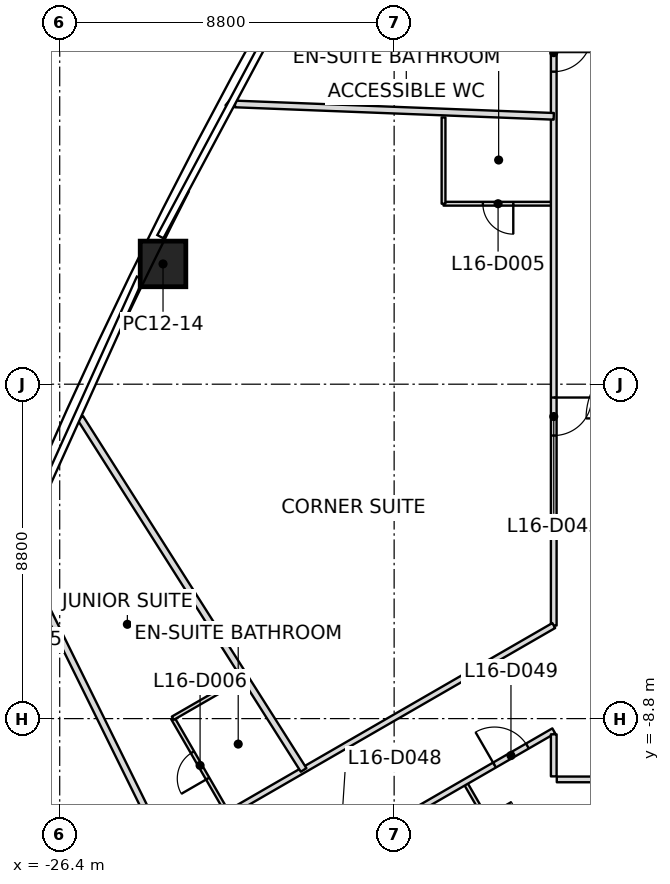
"""IFC4 building model, lengths in metres.
Left out: names, types, materials, properties, quantities, classifications, styles, units other than length and angle.
Written with IfcOpenShell. Run it as: python <this file> out.ifc"""

import sys

from ifc_helpers import new_model, si_unit, direction, frame, frame_2d, origin, origin_2d, place, context, subcontext, project, spatial, rectangle, extrude, element, fill, save


model = new_model("IFC4")
c1 = context("Model", 3, precision=1e-05, world=origin(), true_north=direction((0.0, 1.0)))
c2 = subcontext(c1, "Body", "Model", "MODEL_VIEW")
j1 = project(units=[si_unit("LENGTHUNIT", "METRE"), si_unit("PLANEANGLEUNIT", "RADIAN")], contexts=[c1])
p1 = place(None, origin())
s1 = spatial("IfcSite", under=j1, at=p1, CompositionType="ELEMENT")
p2 = place(p1, origin())
s2 = spatial("IfcBuilding", under=s1, at=p2, CompositionType="ELEMENT")
p3 = place(p2, frame((0.0, 0.0, 81.3)))
s3 = spatial("IfcBuildingStorey", under=s2, at=p3, CompositionType="ELEMENT", Elevation=81.3)
p4 = place(p3, frame((-23.681, 3.165, 0.0), z_axis=(0.015306644787, 0.002309192102, 0.99988017995), x_axis=(0.441466655393, 0.897234204469, -0.008830317467)))
e1 = element("IfcColumn", 1, at=p4, inside=s3, PredefinedType="COLUMN", context=c2, shape_type="SweptSolid", body=[
    extrude(rectangle(XDim=1.2, YDim=1.2, at=origin_2d()), origin(), (0.0, 0.0, 1.0), 3.7),
])
p5 = place(p3, frame((-27.428, -5.133, 0.0), z_axis=(0.019460669214, 0.010950749456, 0.999750650632), x_axis=(0.381024023637, 0.924398704075, -0.017542215233)))
e2 = element("IfcColumn", 2, at=p5, inside=s3, PredefinedType="COLUMN", context=c2, shape_type="SweptSolid", body=[
    extrude(rectangle(XDim=1.2, YDim=1.2, at=origin_2d()), origin(), (0.0, 0.0, 1.0), 3.701),
])
p6 = place(p3, frame((-23.619, -12.251, 0.0), z_axis=(0.0, 0.0, 1.0), x_axis=(-0.442324638578, 0.896855012868, 0.0)))
e3 = element("IfcWall", 3, at=p6, inside=s3, PredefinedType="PARTITIONING", context=c2, shape_type="SweptSolid", body=[
    extrude(rectangle(XDim=8.701, YDim=0.175, at=frame_2d((4.351, 0.0))), origin(), (0.0, 0.0, 1.0), 3.15),
])
p7 = place(p3, frame((-19.982, -10.151, 0.0), z_axis=(0.0, 0.0, 1.0), x_axis=(-0.535687161916, 0.844416523144, 0.0)))
e4 = element("IfcWall", 4, at=p7, inside=s3, PredefinedType="PARTITIONING", context=c2, shape_type="SweptSolid", body=[
    extrude(rectangle(XDim=10.972, YDim=0.175, at=frame_2d((5.486, 0.0))), origin(), (0.0, 0.0, 1.0), 2.934),
])
p8 = place(p3, frame((-21.837, 7.288, 0.0), z_axis=(0.0, 0.0, 1.0), x_axis=(-0.77226902916, 0.635295637164, 0.0)))
e5 = element("IfcWall", 5, at=p8, inside=s3, PredefinedType="PARTITIONING", context=c2, shape_type="SweptSolid", body=[
    extrude(rectangle(XDim=0.187, YDim=0.175, at=frame_2d((0.094, 0.0))), origin(), (0.0, 0.0, 1.0), 3.15),
])
p9 = place(p3, frame((-21.787, 7.375, 0.0), z_axis=(0.0, 0.0, 1.0), x_axis=(0.999247968332, -0.038774963373, 0.0)))
e6 = element("IfcWall", 6, at=p9, inside=s3, PredefinedType="PARTITIONING", context=c2, shape_type="SweptSolid", body=[
    extrude(rectangle(XDim=8.393, YDim=0.175, at=frame_2d((4.197, 0.0))), origin(), (0.0, 0.0, 1.0), 2.934),
])
p10 = place(p3, frame((-13.4, 10.32, 0.0), z_axis=(0.0, 0.0, 1.0), x_axis=(0.0, -1.0, 0.0)))
e7 = element("IfcWall", 7, at=p10, inside=s3, PredefinedType="PARTITIONING", context=c2, shape_type="SweptSolid", body=[
    extrude(rectangle(XDim=16.671, YDim=0.15, at=frame_2d((8.335, 0.0))), origin(), (0.0, 0.0, 1.0), 2.947),
])
p11 = place(p10, frame((1.095, 0.0, 0.0)))
e8 = element("IfcOpeningElement", 8, at=p11, cuts=e7, PredefinedType="OPENING", context=c2, shape_type="SweptSolid", body=[
    extrude(rectangle(XDim=1.0, YDim=2.1, at=frame_2d((0.5, 1.05))), frame((0.0, 0.075, 0.0), z_axis=(0.0, -1.0, 0.0), x_axis=(1.0, 0.0, 0.0)), (0.0, 0.0, 1.0), 0.15),
])
p12 = place(p10, frame((10.671, 0.0, 0.0)))
e9 = element("IfcOpeningElement", 9, at=p12, cuts=e7, PredefinedType="OPENING", context=c2, shape_type="SweptSolid", body=[
    extrude(rectangle(XDim=1.0, YDim=2.1, at=frame_2d((0.5, 1.05))), frame((0.0, 0.075, 0.0), z_axis=(0.0, -1.0, 0.0), x_axis=(1.0, 0.0, 0.0)), (0.0, 0.0, 1.0), 0.15),
])
p13 = place(p3, frame((-13.4, -6.351, 0.0), z_axis=(0.0, 0.0, 1.0), x_axis=(-0.866028447449, -0.499994728181, 0.0)))
e10 = element("IfcWall", 10, at=p13, inside=s3, PredefinedType="PARTITIONING", context=c2, shape_type="SweptSolid", body=[
    extrude(rectangle(XDim=11.72, YDim=0.15, at=frame_2d((5.86, 0.0))), origin(), (0.0, 0.0, 1.0), 2.947),
])
p14 = place(p13, frame((10.4, 0.0, 0.0)))
e11 = element("IfcOpeningElement", 11, at=p14, cuts=e10, PredefinedType="OPENING", context=c2, shape_type="SweptSolid", body=[
    extrude(rectangle(XDim=1.0, YDim=2.1, at=frame_2d((0.5, 1.05))), frame((0.0, 0.075, 0.0), z_axis=(0.0, -1.0, 0.0), x_axis=(1.0, 0.0, 0.0)), (0.0, 0.0, 1.0), 0.15),
])
p15 = place(p3, frame((-22.35, -14.29, 0.0), z_axis=(0.0, 0.0, 1.0), x_axis=(0.866021934756, 0.500006008485, 0.0)))
e12 = element("IfcWall", 12, at=p15, inside=s3, PredefinedType="PARTITIONING", context=c2, shape_type="SweptSolid", body=[
    extrude(rectangle(XDim=10.335, YDim=0.15, at=frame_2d((5.167, 0.0))), origin(), (0.0, 0.0, 1.0), 2.797),
])
p16 = place(p15, frame((3.327, 0.0, 0.0)))
e13 = element("IfcOpeningElement", 13, at=p16, cuts=e12, PredefinedType="OPENING", context=c2, shape_type="SweptSolid", body=[
    extrude(rectangle(XDim=1.0, YDim=2.1, at=frame_2d((0.5, 1.05))), frame((0.0, 0.075, 0.0), z_axis=(0.0, -1.0, 0.0), x_axis=(1.0, 0.0, 0.0)), (0.0, 0.0, 1.0), 0.15),
])
p17 = place(p15, frame((8.535, 0.0, 0.0)))
e14 = element("IfcOpeningElement", 14, at=p17, cuts=e12, PredefinedType="OPENING", context=c2, shape_type="SweptSolid", body=[
    extrude(rectangle(XDim=1.0, YDim=2.1, at=frame_2d((0.5, 1.05))), frame((0.0, 0.075, 0.0), z_axis=(0.0, -1.0, 0.0), x_axis=(1.0, 0.0, 0.0)), (0.0, 0.0, 1.0), 0.15),
])
p18 = place(p3, frame((-13.4, -9.214, 0.0), z_axis=(0.0, 0.0, 1.0), x_axis=(0.0, -1.0, 0.0)))
e15 = element("IfcWall", 15, at=p18, inside=s3, PredefinedType="PARTITIONING", context=c2, shape_type="SweptSolid", body=[
    extrude(rectangle(XDim=1.106, YDim=0.15, at=frame_2d((0.553, 0.0))), origin(), (0.0, 0.0, 1.0), 2.797),
])
p19 = place(p3, frame((-13.32, -10.4, 0.0), z_axis=(0.0, 0.0, 1.0), x_axis=(1.0, 0.0, 0.0)))
e16 = element("IfcWall", 16, at=p19, inside=s3, PredefinedType="PARTITIONING", context=c2, shape_type="SweptSolid", body=[
    extrude(rectangle(XDim=26.64, YDim=0.15, at=frame_2d((13.32, 0.0))), origin(), (0.0, 0.0, 1.0), 2.947),
])
p20 = place(p19, frame((7.72, 0.0, 0.0)))
e17 = element("IfcOpeningElement", 17, at=p20, cuts=e16, PredefinedType="OPENING", context=c2, shape_type="SweptSolid", body=[
    extrude(rectangle(XDim=1.0, YDim=2.1, at=frame_2d((0.5, 1.05))), frame((0.0, 0.075, 0.0), z_axis=(0.0, -1.0, 0.0), x_axis=(1.0, 0.0, 0.0)), (0.0, 0.0, 1.0), 0.15),
])
p21 = place(p19, frame((11.92, 0.0, 0.0)))
e18 = element("IfcOpeningElement", 18, at=p21, cuts=e16, PredefinedType="OPENING", context=c2, shape_type="SweptSolid", body=[
    extrude(rectangle(XDim=1.0, YDim=2.1, at=frame_2d((0.5, 1.05))), frame((0.0, 0.075, 0.0), z_axis=(0.0, -1.0, 0.0), x_axis=(1.0, 0.0, 0.0)), (0.0, 0.0, 1.0), 0.15),
])
p22 = place(p19, frame((16.52, 0.0, 0.0)))
e19 = element("IfcOpeningElement", 19, at=p22, cuts=e16, PredefinedType="OPENING", context=c2, shape_type="SweptSolid", body=[
    extrude(rectangle(XDim=1.0, YDim=2.1, at=frame_2d((0.5, 1.05))), frame((0.0, 0.075, 0.0), z_axis=(0.0, -1.0, 0.0), x_axis=(1.0, 0.0, 0.0)), (0.0, 0.0, 1.0), 0.15),
])
p23 = place(p19, frame((21.12, 0.0, 0.0)))
e20 = element("IfcOpeningElement", 20, at=p23, cuts=e16, PredefinedType="OPENING", context=c2, shape_type="SweptSolid", body=[
    extrude(rectangle(XDim=1.0, YDim=2.1, at=frame_2d((0.5, 1.05))), frame((0.0, 0.075, 0.0), z_axis=(0.0, -1.0, 0.0), x_axis=(1.0, 0.0, 0.0)), (0.0, 0.0, 1.0), 0.15),
])
p24 = place(p3, frame((-21.989, -11.275, 0.0), z_axis=(0.0, 0.0, 1.0), x_axis=(-0.499972835562, 0.866041086612, 0.0)))
e21 = element("IfcWall", 21, at=p24, inside=s3, PredefinedType="PARTITIONING", context=c2, shape_type="SweptSolid", body=[
    extrude(rectangle(XDim=2.87, YDim=0.1, at=frame_2d((1.435, 0.0))), origin(), (0.0, 0.0, 1.0), 3.15),
])
p25 = place(p24, frame((1.035, 0.0, 0.0)))
e22 = element("IfcOpeningElement", 22, at=p25, cuts=e21, PredefinedType="OPENING", context=c2, shape_type="SweptSolid", body=[
    extrude(rectangle(XDim=0.8, YDim=2.1, at=frame_2d((0.4, 1.05))), frame((0.0, 0.05, 0.0), z_axis=(0.0, -1.0, 0.0), x_axis=(1.0, 0.0, 0.0)), (0.0, 0.0, 1.0), 0.1),
])
p26 = place(p3, frame((-23.424, -8.79, 0.0), z_axis=(0.0, 0.0, 1.0), x_axis=(0.866017224141, 0.500014167291, 0.0)))
e23 = element("IfcWall", 23, at=p26, inside=s3, PredefinedType="PARTITIONING", context=c2, shape_type="SweptSolid", body=[
    extrude(rectangle(XDim=2.27, YDim=0.1, at=frame_2d((1.135, 0.0))), origin(), (0.0, 0.0, 1.0), 3.15),
])
p27 = place(p3, frame((-13.43, 4.749, 0.0), z_axis=(0.0, 0.0, 1.0), x_axis=(-1.0, 0.0, 0.0)))
e24 = element("IfcWall", 24, at=p27, inside=s3, PredefinedType="PARTITIONING", context=c2, shape_type="SweptSolid", body=[
    extrude(rectangle(XDim=2.87, YDim=0.1, at=frame_2d((1.435, 0.0))), origin(), (0.0, 0.0, 1.0), 3.15),
])
p28 = place(p27, frame((1.035, 0.0, 0.0)))
e25 = element("IfcOpeningElement", 25, at=p28, cuts=e24, PredefinedType="OPENING", context=c2, shape_type="SweptSolid", body=[
    extrude(rectangle(XDim=0.8, YDim=2.1, at=frame_2d((0.4, 1.05))), frame((0.0, 0.05, 0.0), z_axis=(0.0, -1.0, 0.0), x_axis=(1.0, 0.0, 0.0)), (0.0, 0.0, 1.0), 0.1),
])
p29 = place(p3, frame((-16.3, 4.749, 0.0), z_axis=(0.0, 0.0, 1.0), x_axis=(0.0, 1.0, 0.0)))
e26 = element("IfcWall", 26, at=p29, inside=s3, PredefinedType="PARTITIONING", context=c2, shape_type="SweptSolid", body=[
    extrude(rectangle(XDim=2.27, YDim=0.1, at=frame_2d((1.135, 0.0))), origin(), (0.0, 0.0, 1.0), 3.15),
])
p30 = place(p3, frame((-15.723, -10.498, 0.0), z_axis=(0.0, 0.0, 1.0), x_axis=(0.499999802827, -0.866025517622, 0.0)))
e27 = element("IfcWall", 27, at=p30, inside=s3, PredefinedType="PARTITIONING", context=c2, shape_type="SweptSolid", body=[
    extrude(rectangle(XDim=2.87, YDim=0.1, at=frame_2d((1.435, 0.0))), origin(), (0.0, 0.0, 1.0), 2.797),
])
p31 = place(p30, frame((1.035, 0.0, 0.0)))
e28 = element("IfcOpeningElement", 28, at=p31, cuts=e27, PredefinedType="OPENING", context=c2, shape_type="SweptSolid", body=[
    extrude(rectangle(XDim=0.8, YDim=2.1, at=frame_2d((0.4, 1.05))), frame((0.0, 0.05, 0.0), z_axis=(0.0, -1.0, 0.0), x_axis=(1.0, 0.0, 0.0)), (0.0, 0.0, 1.0), 0.1),
])
p32 = place(p11, origin())
e29 = element("IfcDoor", 29, at=p32, inside=s3, OperationType="SINGLE_SWING_RIGHT", PredefinedType="DOOR", context=c2, shape_type="SweptSolid", body=[
    extrude(rectangle(XDim=1.0, YDim=2.1, at=frame_2d((0.5, 1.05))), frame((0.0, 0.025, 0.0), z_axis=(0.0, -1.0, 0.0), x_axis=(1.0, 0.0, 0.0)), (0.0, 0.0, 1.0), 0.05),
])
fill(e8, e29)
p33 = place(p12, origin())
e30 = element("IfcDoor", 30, at=p33, inside=s3, OperationType="SINGLE_SWING_RIGHT", PredefinedType="DOOR", context=c2, shape_type="SweptSolid", body=[
    extrude(rectangle(XDim=1.0, YDim=2.1, at=frame_2d((0.5, 1.05))), frame((0.0, 0.025, 0.0), z_axis=(0.0, -1.0, 0.0), x_axis=(1.0, 0.0, 0.0)), (0.0, 0.0, 1.0), 0.05),
])
fill(e9, e30)
p34 = place(p28, origin())
e31 = element("IfcDoor", 31, at=p34, inside=s3, OperationType="SINGLE_SWING_RIGHT", PredefinedType="DOOR", context=c2, shape_type="SweptSolid", body=[
    extrude(rectangle(XDim=0.8, YDim=2.1, at=frame_2d((0.4, 1.05))), frame((0.0, 0.025, 0.0), z_axis=(0.0, -1.0, 0.0), x_axis=(1.0, 0.0, 0.0)), (0.0, 0.0, 1.0), 0.05),
])
fill(e25, e31)
p35 = place(p25, origin())
e32 = element("IfcDoor", 32, at=p35, inside=s3, OperationType="SINGLE_SWING_RIGHT", PredefinedType="DOOR", context=c2, shape_type="SweptSolid", body=[
    extrude(rectangle(XDim=0.8, YDim=2.1, at=frame_2d((0.4, 1.05))), frame((0.0, 0.025, 0.0), z_axis=(0.0, -1.0, 0.0), x_axis=(1.0, 0.0, 0.0)), (0.0, 0.0, 1.0), 0.05),
])
fill(e22, e32)
p36 = place(p17, origin())
e33 = element("IfcDoor", 33, at=p36, inside=s3, OperationType="SINGLE_SWING_LEFT", PredefinedType="DOOR", context=c2, shape_type="SweptSolid", body=[
    extrude(rectangle(XDim=1.0, YDim=2.1, at=frame_2d((0.5, 1.05))), frame((0.0, 0.025, 0.0), z_axis=(0.0, -1.0, 0.0), x_axis=(1.0, 0.0, 0.0)), (0.0, 0.0, 1.0), 0.05),
])
fill(e14, e33)
save(model, sys.argv[1])
